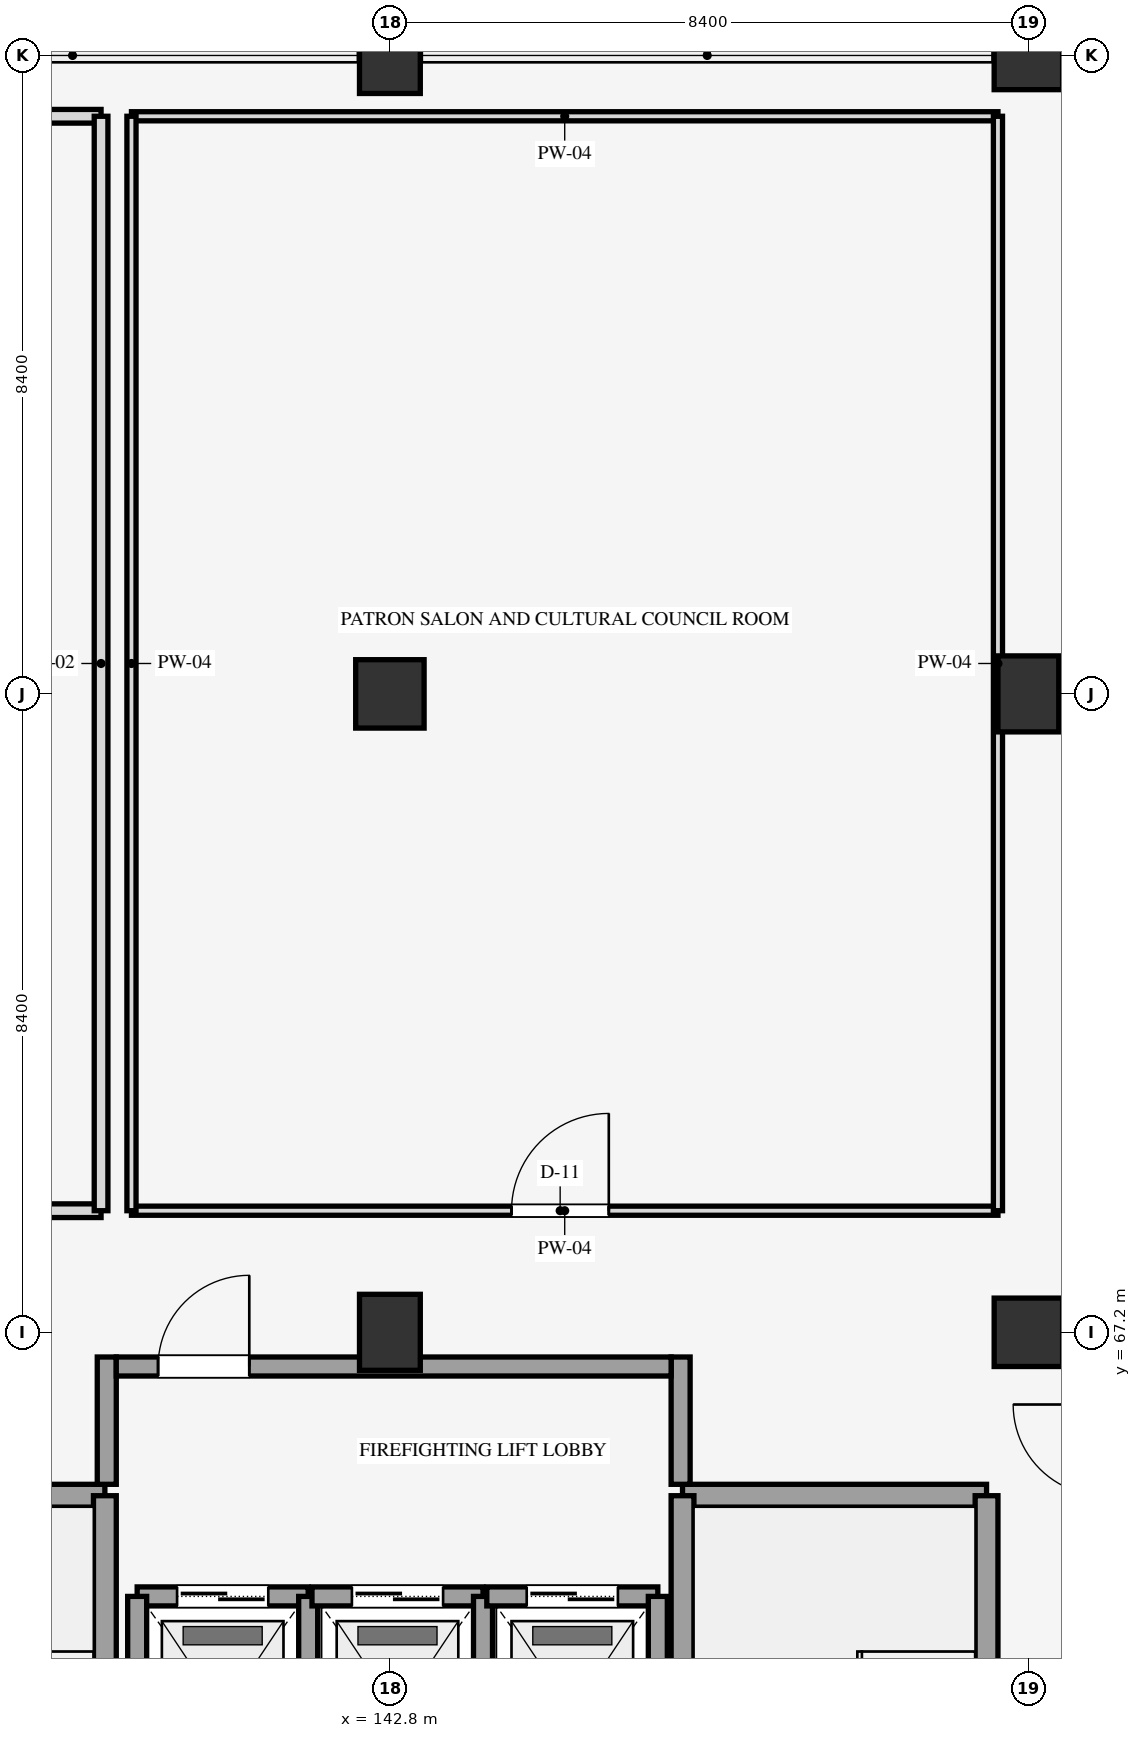
"""IFC4 building model, lengths in metres.
Left out: names, types, materials, properties, quantities, classifications, styles, units other than length and angle.
Written with IfcOpenShell. Run it as: python <this file> out.ifc"""

import sys

from ifc_helpers import new_model, si_unit, direction, frame, frame_2d, origin, origin_2d, place, context, subcontext, project, spatial, rectangle, extrude, element, fill, save


model = new_model("IFC4")
c1 = context("Model", 3, precision=1e-05, world=origin(), true_north=direction((0.0, 1.0)))
c2 = subcontext(c1, "Body", "Model", "MODEL_VIEW")
j1 = project(units=[si_unit("LENGTHUNIT", "METRE"), si_unit("PLANEANGLEUNIT", "RADIAN")], contexts=[c1])
p1 = place(None, origin())
s1 = spatial("IfcSite", under=j1, at=p1, CompositionType="ELEMENT")
p2 = place(p1, origin())
s2 = spatial("IfcBuilding", under=s1, at=p2, CompositionType="ELEMENT")
p3 = place(p2, frame((0.0, 0.0, 61.5)))
s3 = spatial("IfcBuildingStorey", under=s2, at=p3, CompositionType="ELEMENT", Elevation=61.5)
p4 = place(p3, frame((142.8, 67.2, 0.0), z_axis=(0.0, 0.0, 1.0), x_axis=(1.0, 0.0, 0.0)))
e1 = element("IfcColumn", 1, at=p4, inside=s3, PredefinedType="COLUMN", context=c2, shape_type="SweptSolid", body=[
    extrude(rectangle(XDim=0.8, YDim=1.0, at=origin_2d()), origin(), (0.0, 0.0, 1.0), 4.2),
])
p5 = place(p3, frame((142.8, 75.6, 0.0), z_axis=(0.0, 0.0, 1.0), x_axis=(1.0, 0.0, 0.0)))
e2 = element("IfcColumn", 2, at=p5, inside=s3, PredefinedType="COLUMN", context=c2, shape_type="SweptSolid", body=[
    extrude(rectangle(XDim=0.9, YDim=0.9, at=origin_2d()), origin(), (0.0, 0.0, 1.0), 4.2),
])
p6 = place(p3, frame((142.8, 84.0, 0.0), z_axis=(0.0, 0.0, 1.0), x_axis=(1.0, 0.0, 0.0)))
e3 = element("IfcColumn", 3, at=p6, inside=s3, PredefinedType="COLUMN", context=c2, shape_type="SweptSolid", body=[
    extrude(rectangle(XDim=0.8, YDim=1.0, at=origin_2d()), origin(), (0.0, 0.0, 1.0), 4.2),
])
p7 = place(p3, frame((151.2, 67.2, 0.0), z_axis=(0.0, 0.0, 1.0), x_axis=(1.0, 0.0, 0.0)))
e4 = element("IfcColumn", 4, at=p7, inside=s3, PredefinedType="COLUMN", context=c2, shape_type="SweptSolid", body=[
    extrude(rectangle(XDim=0.9, YDim=0.9, at=origin_2d()), origin(), (0.0, 0.0, 1.0), 4.2),
])
p8 = place(p3, frame((151.2, 75.6, 0.0), z_axis=(0.0, 0.0, 1.0), x_axis=(1.0, 0.0, 0.0)))
e5 = element("IfcColumn", 5, at=p8, inside=s3, PredefinedType="COLUMN", context=c2, shape_type="SweptSolid", body=[
    extrude(rectangle(XDim=0.8, YDim=1.0, at=origin_2d()), origin(), (0.0, 0.0, 1.0), 4.2),
])
p9 = place(p3, frame((151.2, 84.0, 0.0), z_axis=(0.0, 0.0, 1.0), x_axis=(1.0, 0.0, 0.0)))
e6 = element("IfcColumn", 6, at=p9, inside=s3, PredefinedType="COLUMN", context=c2, shape_type="SweptSolid", body=[
    extrude(rectangle(XDim=0.9, YDim=0.9, at=origin_2d()), origin(), (0.0, 0.0, 1.0), 4.2),
])
p10 = place(p3, frame((135.05, 65.05, 0.0), z_axis=(0.0, 0.0, 1.0), x_axis=(1.0, 0.0, 0.0)))
e7 = element("IfcWall", 7, at=p10, inside=s3, PredefinedType="SHEAR", context=c2, shape_type="SweptSolid", body=[
    extrude(rectangle(XDim=4.0, YDim=0.3, at=frame_2d((2.0, 0.0))), origin(), (0.0, 0.0, 1.0), 4.2),
])
p11 = place(p3, frame((139.05, 50.75, 0.0), z_axis=(0.0, 0.0, 1.0), x_axis=(0.0, 1.0, 0.0)))
e8 = element("IfcWall", 8, at=p11, inside=s3, PredefinedType="SHEAR", context=c2, shape_type="SweptSolid", body=[
    extrude(rectangle(XDim=14.3, YDim=0.3, at=frame_2d((7.15, 0.0))), origin(), (0.0, 0.0, 1.0), 4.2),
])
p12 = place(p3, frame((146.65, 65.05, 0.0), z_axis=(0.0, 0.0, 1.0), x_axis=(1.0, 0.0, 0.0)))
e9 = element("IfcWall", 9, at=p12, inside=s3, PredefinedType="SHEAR", context=c2, shape_type="SweptSolid", body=[
    extrude(rectangle(XDim=4.0, YDim=0.3, at=frame_2d((2.0, 0.0))), origin(), (0.0, 0.0, 1.0), 4.2),
])
for number, where, z_axis, x_axis in (
    (10, (146.65, 50.75, 0.0), (0.0, 0.0, 1.0), (0.0, 1.0, 0.0)),
    (11, (150.65, 50.75, 0.0), (0.0, 0.0, 1.0), (0.0, 1.0, 0.0)),
):
    element("IfcWall", number, at=place(p3, frame(where, z_axis=z_axis, x_axis=x_axis)), inside=s3, PredefinedType="SHEAR", context=c2, shape_type="SweptSolid", body=[
        extrude(rectangle(XDim=14.3, YDim=0.3, at=frame_2d((7.15, 0.0))), origin(), (0.0, 0.0, 1.0), 4.2),
    ])
p13 = place(p3, frame((148.85, 52.4, 0.0), z_axis=(0.0, 0.0, 1.0), x_axis=(0.0, 1.0, 0.0)))
e12 = element("IfcWall", 12, at=p13, inside=s3, PredefinedType="SHEAR", context=c2, shape_type="SweptSolid", body=[
    extrude(rectangle(XDim=11.0, YDim=0.2, at=frame_2d((5.5, 0.0))), origin(), (0.0, 0.0, 1.0), 4.2),
])
p14 = place(p3, frame((139.475, 63.725, 0.0), z_axis=(0.0, 0.0, 1.0), x_axis=(1.0, 0.0, 0.0)))
e13 = element("IfcWall", 13, at=p14, inside=s3, PredefinedType="SHEAR", context=c2, shape_type="SweptSolid", body=[
    extrude(rectangle(XDim=2.25, YDim=0.25, at=frame_2d((1.125, 0.0))), origin(), (0.0, 0.0, 1.0), 3.96),
])
p15 = place(p14, frame((0.525, 0.0, 0.0)))
e14 = element("IfcOpeningElement", 14, at=p15, cuts=e13, PredefinedType="OPENING", context=c2, shape_type="SweptSolid", body=[
    extrude(rectangle(XDim=1.2, YDim=2.18, at=frame_2d((0.6, 1.09))), frame((0.0, 0.135, 0.0), z_axis=(0.0, -1.0, 0.0), x_axis=(1.0, 0.0, 0.0)), (0.0, 0.0, 1.0), 0.27),
])
for number, where, z_axis, x_axis in (
    (15, (139.475, 60.675, 0.0), (0.0, 0.0, 1.0), (0.0, 1.0, 0.0)),
    (16, (141.725, 60.675, 0.0), (0.0, 0.0, 1.0), (0.0, 1.0, 0.0)),
):
    element("IfcWall", number, at=place(p3, frame(where, z_axis=z_axis, x_axis=x_axis)), inside=s3, PredefinedType="SHEAR", context=c2, shape_type="SweptSolid", body=[
        extrude(rectangle(XDim=3.05, YDim=0.25, at=frame_2d((1.525, 0.0))), origin(), (0.0, 0.0, 1.0), 3.96),
    ])
p16 = place(p3, frame((141.775, 63.725, 0.0), z_axis=(0.0, 0.0, 1.0), x_axis=(1.0, 0.0, 0.0)))
e17 = element("IfcWall", 17, at=p16, inside=s3, PredefinedType="SHEAR", context=c2, shape_type="SweptSolid", body=[
    extrude(rectangle(XDim=2.25, YDim=0.25, at=frame_2d((1.125, 0.0))), origin(), (0.0, 0.0, 1.0), 3.96),
])
p17 = place(p16, frame((0.525, 0.0, 0.0)))
e18 = element("IfcOpeningElement", 18, at=p17, cuts=e17, PredefinedType="OPENING", context=c2, shape_type="SweptSolid", body=[
    extrude(rectangle(XDim=1.2, YDim=2.18, at=frame_2d((0.6, 1.09))), frame((0.0, 0.135, 0.0), z_axis=(0.0, -1.0, 0.0), x_axis=(1.0, 0.0, 0.0)), (0.0, 0.0, 1.0), 0.27),
])
p18 = place(p3, frame((144.025, 60.675, 0.0), z_axis=(0.0, 0.0, 1.0), x_axis=(0.0, 1.0, 0.0)))
e19 = element("IfcWall", 19, at=p18, inside=s3, PredefinedType="SHEAR", context=c2, shape_type="SweptSolid", body=[
    extrude(rectangle(XDim=3.05, YDim=0.25, at=frame_2d((1.525, 0.0))), origin(), (0.0, 0.0, 1.0), 3.96),
])
p19 = place(p3, frame((144.075, 63.725, 0.0), z_axis=(0.0, 0.0, 1.0), x_axis=(1.0, 0.0, 0.0)))
e20 = element("IfcWall", 20, at=p19, inside=s3, PredefinedType="SHEAR", context=c2, shape_type="SweptSolid", body=[
    extrude(rectangle(XDim=2.25, YDim=0.25, at=frame_2d((1.125, 0.0))), origin(), (0.0, 0.0, 1.0), 3.96),
])
p20 = place(p19, frame((0.525, 0.0, 0.0)))
e21 = element("IfcOpeningElement", 21, at=p20, cuts=e20, PredefinedType="OPENING", context=c2, shape_type="SweptSolid", body=[
    extrude(rectangle(XDim=1.2, YDim=2.18, at=frame_2d((0.6, 1.09))), frame((0.0, 0.135, 0.0), z_axis=(0.0, -1.0, 0.0), x_axis=(1.0, 0.0, 0.0)), (0.0, 0.0, 1.0), 0.27),
])
p21 = place(p3, frame((146.325, 60.675, 0.0), z_axis=(0.0, 0.0, 1.0), x_axis=(0.0, 1.0, 0.0)))
e22 = element("IfcWall", 22, at=p21, inside=s3, PredefinedType="SHEAR", context=c2, shape_type="SweptSolid", body=[
    extrude(rectangle(XDim=3.05, YDim=0.25, at=frame_2d((1.525, 0.0))), origin(), (0.0, 0.0, 1.0), 3.96),
])
for number, where, z_axis, x_axis in (
    (23, (139.075, 65.2, 0.0), (0.0, 0.0, 1.0), (0.0, 1.0, 0.0)),
    (24, (146.625, 65.2, 0.0), (0.0, 0.0, 1.0), (0.0, 1.0, 0.0)),
):
    element("IfcWall", number, at=place(p3, frame(where, z_axis=z_axis, x_axis=x_axis)), inside=s3, PredefinedType="SHEAR", context=c2, shape_type="SweptSolid", body=[
        extrude(rectangle(XDim=1.675, YDim=0.25, at=frame_2d((0.837, 0.0))), origin(), (0.0, 0.0, 1.0), 3.96),
    ])
p22 = place(p3, frame((139.2, 66.75, 0.0), z_axis=(0.0, 0.0, 1.0), x_axis=(1.0, 0.0, 0.0)))
e25 = element("IfcWall", 25, at=p22, inside=s3, PredefinedType="SHEAR", context=c2, shape_type="SweptSolid", body=[
    extrude(rectangle(XDim=7.3, YDim=0.25, at=frame_2d((3.65, 0.0))), origin(), (0.0, 0.0, 1.0), 3.96),
])
p23 = place(p22, frame((0.55, 0.0, 0.0)))
e26 = element("IfcOpeningElement", 26, at=p23, cuts=e25, PredefinedType="OPENING", context=c2, shape_type="SweptSolid", body=[
    extrude(rectangle(XDim=1.2, YDim=2.15, at=frame_2d((0.6, 1.075))), frame((0.0, 0.135, 0.0), z_axis=(0.0, -1.0, 0.0), x_axis=(1.0, 0.0, 0.0)), (0.0, 0.0, 1.0), 0.27),
])
p24 = place(p3, frame((126.8, 68.8, 0.0), z_axis=(0.0, 0.0, 1.0), x_axis=(1.0, 0.0, 0.0)))
e27 = element("IfcWall", 27, at=p24, inside=s3, PredefinedType="PARTITIONING", context=c2, shape_type="SweptSolid", body=[
    extrude(rectangle(XDim=12.2, YDim=0.18, at=frame_2d((6.1, 0.0))), origin(), (0.0, 0.0, 1.0), 3.24),
])
p25 = place(p24, frame((5.0, 0.0, 0.0)))
e28 = element("IfcOpeningElement", 28, at=p25, cuts=e27, PredefinedType="OPENING", context=c2, shape_type="SweptSolid", body=[
    extrude(rectangle(XDim=1.02, YDim=2.1, at=frame_2d((0.51, 1.05))), frame((0.0, 0.1, 0.0), z_axis=(0.0, -1.0, 0.0), x_axis=(1.0, 0.0, 0.0)), (0.0, 0.0, 1.0), 0.2),
])
p26 = place(p3, frame((126.8, 83.2, 0.0), z_axis=(0.0, 0.0, 1.0), x_axis=(1.0, 0.0, 0.0)))
e29 = element("IfcWall", 29, at=p26, inside=s3, PredefinedType="PARTITIONING", context=c2, shape_type="SweptSolid", body=[
    extrude(rectangle(XDim=12.2, YDim=0.18, at=frame_2d((6.1, 0.0))), origin(), (0.0, 0.0, 1.0), 3.24),
])
p27 = place(p3, frame((139.0, 68.8, 0.0), z_axis=(0.0, 0.0, 1.0), x_axis=(0.0, 1.0, 0.0)))
e30 = element("IfcWall", 30, at=p27, inside=s3, PredefinedType="PARTITIONING", context=c2, shape_type="SweptSolid", body=[
    extrude(rectangle(XDim=14.4, YDim=0.18, at=frame_2d((7.2, 0.0))), origin(), (0.0, 0.0, 1.0), 3.24),
])
p28 = place(p3, frame((139.4, 68.8, 0.0), z_axis=(0.0, 0.0, 1.0), x_axis=(1.0, 0.0, 0.0)))
e31 = element("IfcWall", 31, at=p28, inside=s3, PredefinedType="PARTITIONING", context=c2, shape_type="SweptSolid", body=[
    extrude(rectangle(XDim=11.4, YDim=0.12, at=frame_2d((5.7, 0.0))), origin(), (0.0, 0.0, 1.0), 3.24),
])
p29 = place(p28, frame((5.0, 0.0, 0.0)))
e32 = element("IfcOpeningElement", 32, at=p29, cuts=e31, PredefinedType="OPENING", context=c2, shape_type="SweptSolid", body=[
    extrude(rectangle(XDim=1.28, YDim=2.16, at=frame_2d((0.64, 1.08))), frame((0.0, 0.07, 0.0), z_axis=(0.0, -1.0, 0.0), x_axis=(1.0, 0.0, 0.0)), (0.0, 0.0, 1.0), 0.14),
])
p30 = place(p3, frame((139.4, 83.2, 0.0), z_axis=(0.0, 0.0, 1.0), x_axis=(1.0, 0.0, 0.0)))
e33 = element("IfcWall", 33, at=p30, inside=s3, PredefinedType="PARTITIONING", context=c2, shape_type="SweptSolid", body=[
    extrude(rectangle(XDim=11.4, YDim=0.12, at=frame_2d((5.7, 0.0))), origin(), (0.0, 0.0, 1.0), 3.24),
])
for number, where, z_axis, x_axis in (
    (34, (139.4, 68.8, 0.0), (0.0, 0.0, 1.0), (0.0, 1.0, 0.0)),
    (35, (150.8, 68.8, 0.0), (0.0, 0.0, 1.0), (0.0, 1.0, 0.0)),
):
    element("IfcWall", number, at=place(p3, frame(where, z_axis=z_axis, x_axis=x_axis)), inside=s3, PredefinedType="PARTITIONING", context=c2, shape_type="SweptSolid", body=[
        extrude(rectangle(XDim=14.4, YDim=0.12, at=frame_2d((7.2, 0.0))), origin(), (0.0, 0.0, 1.0), 3.24),
    ])
p31 = place(p15, origin())
e36 = element("IfcDoor", 36, at=p31, inside=s3, OperationType="DOUBLE_DOOR_SLIDING", PredefinedType="DOOR", context=c2, shape_type="SweptSolid", body=[
    extrude(rectangle(XDim=1.2, YDim=2.18, at=frame_2d((0.6, 1.09))), frame((0.0, 0.025, 0.0), z_axis=(0.0, -1.0, 0.0), x_axis=(1.0, 0.0, 0.0)), (0.0, 0.0, 1.0), 0.05),
])
fill(e14, e36)
p32 = place(p17, origin())
e37 = element("IfcDoor", 37, at=p32, inside=s3, OperationType="DOUBLE_DOOR_SLIDING", PredefinedType="DOOR", context=c2, shape_type="SweptSolid", body=[
    extrude(rectangle(XDim=1.2, YDim=2.18, at=frame_2d((0.6, 1.09))), frame((0.0, 0.025, 0.0), z_axis=(0.0, -1.0, 0.0), x_axis=(1.0, 0.0, 0.0)), (0.0, 0.0, 1.0), 0.05),
])
fill(e18, e37)
p33 = place(p20, origin())
e38 = element("IfcDoor", 38, at=p33, inside=s3, OperationType="DOUBLE_DOOR_SLIDING", PredefinedType="DOOR", context=c2, shape_type="SweptSolid", body=[
    extrude(rectangle(XDim=1.2, YDim=2.18, at=frame_2d((0.6, 1.09))), frame((0.0, 0.025, 0.0), z_axis=(0.0, -1.0, 0.0), x_axis=(1.0, 0.0, 0.0)), (0.0, 0.0, 1.0), 0.05),
])
fill(e21, e38)
p34 = place(p23, origin())
e39 = element("IfcDoor", 39, at=p34, inside=s3, OperationType="SINGLE_SWING_RIGHT", PredefinedType="DOOR", context=c2, shape_type="SweptSolid", body=[
    extrude(rectangle(XDim=1.2, YDim=2.15, at=frame_2d((0.6, 1.075))), frame((0.0, 0.025, 0.0), z_axis=(0.0, -1.0, 0.0), x_axis=(1.0, 0.0, 0.0)), (0.0, 0.0, 1.0), 0.05),
])
fill(e26, e39)
p35 = place(p29, origin())
e40 = element("IfcDoor", 40, at=p35, inside=s3, OperationType="SINGLE_SWING_RIGHT", PredefinedType="DOOR", context=c2, shape_type="SweptSolid", body=[
    extrude(rectangle(XDim=1.28, YDim=2.16, at=frame_2d((0.64, 1.08))), frame((0.0, 0.025, 0.0), z_axis=(0.0, -1.0, 0.0), x_axis=(1.0, 0.0, 0.0)), (0.0, 0.0, 1.0), 0.05),
])
fill(e32, e40)
save(model, sys.argv[1])
